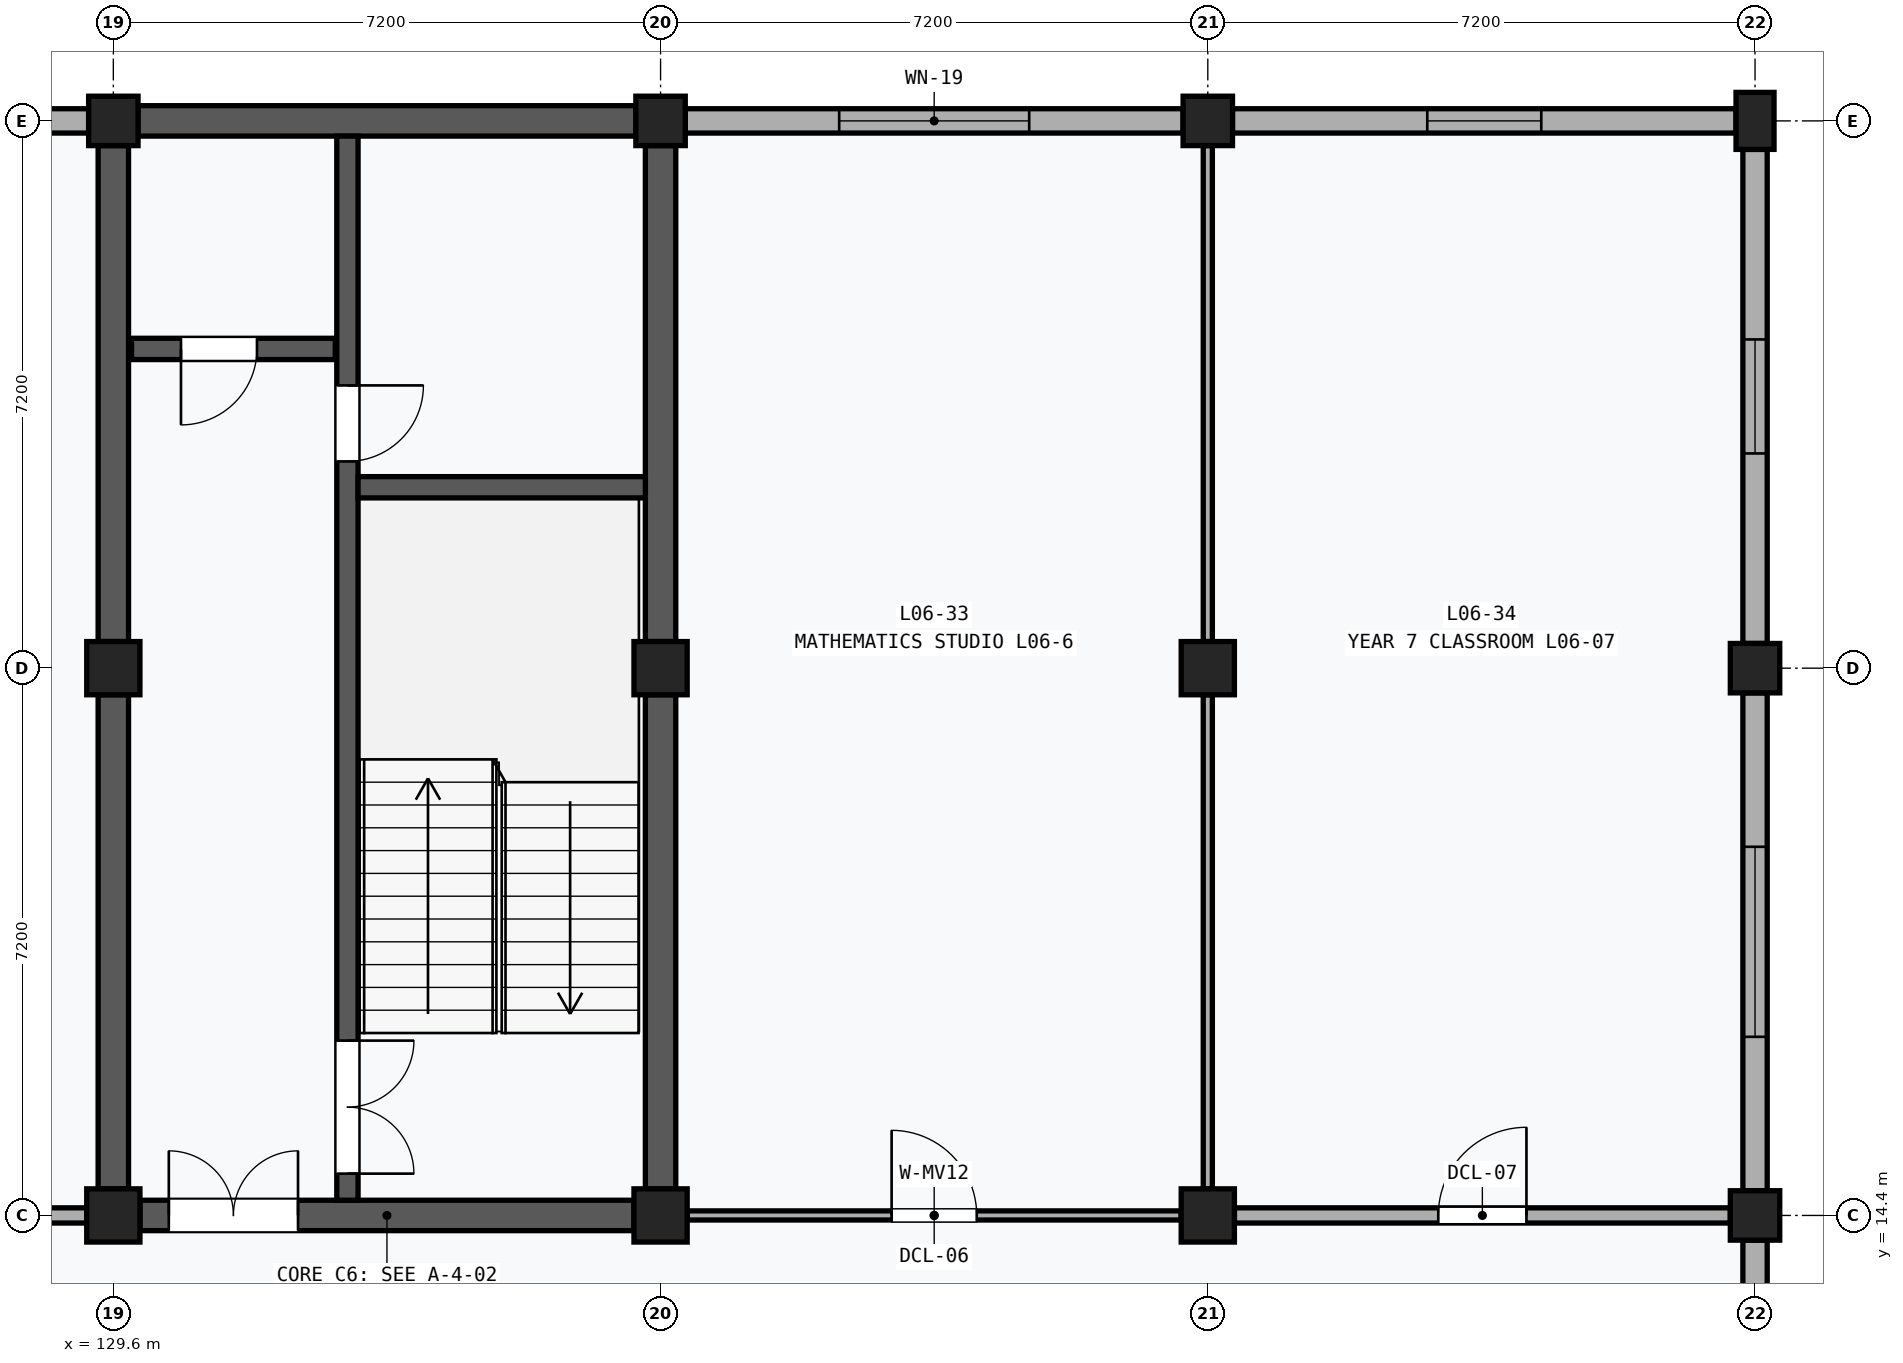
"""IFC4 building model, lengths in metres.
Left out: names, types, materials, properties, quantities, classifications, styles, units other than length and angle.
Written with IfcOpenShell. Run it as: python <this file> out.ifc"""

import sys

from ifc_helpers import new_model, si_unit, direction, frame, frame_2d, origin, origin_2d, place, context, subcontext, project, spatial, rectangle, extrude, element, fill, save


model = new_model("IFC4")
c1 = context("Model", 3, precision=1e-05, world=origin(), true_north=direction((0.0, 1.0)))
c2 = subcontext(c1, "Body", "Model", "MODEL_VIEW")
j1 = project(units=[si_unit("LENGTHUNIT", "METRE"), si_unit("PLANEANGLEUNIT", "RADIAN")], contexts=[c1])
p1 = place(None, origin())
s1 = spatial("IfcSite", under=j1, at=p1, CompositionType="ELEMENT")
p2 = place(p1, origin())
s2 = spatial("IfcBuilding", under=s1, at=p2, CompositionType="ELEMENT")
p3 = place(p2, frame((0.0, 0.0, 26.6)))
s3 = spatial("IfcBuildingStorey", under=s2, at=p3, CompositionType="ELEMENT", Elevation=26.6)
for number, where, z_axis, x_axis in (
    (1, (129.6, 14.4, 0.0), (0.0, 0.0, 1.0), (1.0, 0.0, 0.0)),
    (2, (129.6, 21.6, 0.0), (0.0, 0.0, 1.0), (1.0, 0.0, 0.0)),
):
    element("IfcColumn", number, at=place(p3, frame(where, z_axis=z_axis, x_axis=x_axis)), inside=s3, PredefinedType="COLUMN", context=c2, shape_type="SweptSolid", body=[
        extrude(rectangle(XDim=0.7, YDim=0.7, at=origin_2d()), origin(), (0.0, 0.0, 1.0), 4.0),
    ])
p4 = place(p3, frame((129.6, 28.8, 0.0), z_axis=(0.0, 0.0, 1.0), x_axis=(1.0, 0.0, 0.0)))
e3 = element("IfcColumn", 3, at=p4, inside=s3, PredefinedType="COLUMN", context=c2, shape_type="SweptSolid", body=[
    extrude(rectangle(XDim=0.65, YDim=0.65, at=origin_2d()), origin(), (0.0, 0.0, 1.0), 4.0),
])
for number, where, z_axis, x_axis in (
    (4, (136.8, 14.4, 0.0), (0.0, 0.0, 1.0), (1.0, 0.0, 0.0)),
    (5, (136.8, 21.6, 0.0), (0.0, 0.0, 1.0), (1.0, 0.0, 0.0)),
):
    element("IfcColumn", number, at=place(p3, frame(where, z_axis=z_axis, x_axis=x_axis)), inside=s3, PredefinedType="COLUMN", context=c2, shape_type="SweptSolid", body=[
        extrude(rectangle(XDim=0.7, YDim=0.7, at=origin_2d()), origin(), (0.0, 0.0, 1.0), 4.0),
    ])
p5 = place(p3, frame((136.8, 28.8, 0.0), z_axis=(0.0, 0.0, 1.0), x_axis=(1.0, 0.0, 0.0)))
e6 = element("IfcColumn", 6, at=p5, inside=s3, PredefinedType="COLUMN", context=c2, shape_type="SweptSolid", body=[
    extrude(rectangle(XDim=0.65, YDim=0.65, at=origin_2d()), origin(), (0.0, 0.0, 1.0), 4.0),
])
for number, where, z_axis, x_axis in (
    (7, (144.0, 14.4, 0.0), (0.0, 0.0, 1.0), (1.0, 0.0, 0.0)),
    (8, (144.0, 21.6, 0.0), (0.0, 0.0, 1.0), (1.0, 0.0, 0.0)),
):
    element("IfcColumn", number, at=place(p3, frame(where, z_axis=z_axis, x_axis=x_axis)), inside=s3, PredefinedType="COLUMN", context=c2, shape_type="SweptSolid", body=[
        extrude(rectangle(XDim=0.7, YDim=0.7, at=origin_2d()), origin(), (0.0, 0.0, 1.0), 4.0),
    ])
for number, where, z_axis, x_axis in (
    (9, (144.0, 28.8, 0.0), (0.0, 0.0, 1.0), (1.0, 0.0, 0.0)),
    (10, (151.2, 14.4, 0.0), (0.0, 0.0, 1.0), (1.0, 0.0, 0.0)),
    (11, (151.2, 21.6, 0.0), (0.0, 0.0, 1.0), (1.0, 0.0, 0.0)),
):
    element("IfcColumn", number, at=place(p3, frame(where, z_axis=z_axis, x_axis=x_axis)), inside=s3, PredefinedType="COLUMN", context=c2, shape_type="SweptSolid", body=[
        extrude(rectangle(XDim=0.65, YDim=0.65, at=origin_2d()), origin(), (0.0, 0.0, 1.0), 4.0),
    ])
p6 = place(p3, frame((151.2, 28.8, 0.0), z_axis=(0.0, 0.0, 1.0), x_axis=(1.0, 0.0, 0.0)))
e12 = element("IfcColumn", 12, at=p6, inside=s3, PredefinedType="PILASTER", context=c2, shape_type="SweptSolid", body=[
    extrude(rectangle(XDim=0.5, YDim=0.75, at=origin_2d()), origin(), (0.0, 0.0, 1.0), 4.0),
])
p7 = place(p3, frame((122.725, 28.8, 0.0), z_axis=(0.0, 0.0, 1.0), x_axis=(1.0, 0.0, 0.0)))
e13 = element("IfcWall", 13, at=p7, inside=s3, PredefinedType="SOLIDWALL", context=c2, shape_type="SweptSolid", body=[
    extrude(rectangle(XDim=6.55, YDim=0.32, at=frame_2d((3.275, 0.0))), origin(), (0.0, 0.0, 1.0), 3.1),
])
p8 = place(p7, frame((2.325, 0.0, 1.1)))
e14 = element("IfcOpeningElement", 14, at=p8, cuts=e13, PredefinedType="OPENING", context=c2, shape_type="SweptSolid", body=[
    extrude(rectangle(XDim=1.9, YDim=1.5, at=frame_2d((0.95, 0.75))), frame((0.0, 0.172, 0.0), z_axis=(0.0, -1.0, 0.0), x_axis=(1.0, 0.0, 0.0)), (0.0, 0.0, 1.0), 0.344),
])
p9 = place(p3, frame((137.125, 28.8, 0.0), z_axis=(0.0, 0.0, 1.0), x_axis=(1.0, 0.0, 0.0)))
e15 = element("IfcWall", 15, at=p9, inside=s3, PredefinedType="SOLIDWALL", context=c2, shape_type="SweptSolid", body=[
    extrude(rectangle(XDim=6.55, YDim=0.32, at=frame_2d((3.275, 0.0))), origin(), (0.0, 0.0, 1.0), 3.1),
])
p10 = place(p9, frame((2.025, 0.0, 1.1)))
e16 = element("IfcOpeningElement", 16, at=p10, cuts=e15, PredefinedType="OPENING", context=c2, shape_type="SweptSolid", body=[
    extrude(rectangle(XDim=2.5, YDim=1.5, at=frame_2d((1.25, 0.75))), frame((0.0, 0.172, 0.0), z_axis=(0.0, -1.0, 0.0), x_axis=(1.0, 0.0, 0.0)), (0.0, 0.0, 1.0), 0.344),
])
p11 = place(p3, frame((151.2, 7.525, 0.0), z_axis=(0.0, 0.0, 1.0), x_axis=(0.0, 1.0, 0.0)))
e17 = element("IfcWall", 17, at=p11, inside=s3, PredefinedType="SOLIDWALL", context=c2, shape_type="SweptSolid", body=[
    extrude(rectangle(XDim=6.55, YDim=0.32, at=frame_2d((3.275, 0.0))), origin(), (0.0, 0.0, 1.0), 3.1),
])
p12 = place(p11, frame((2.175, 0.0, 1.1)))
e18 = element("IfcOpeningElement", 18, at=p12, cuts=e17, PredefinedType="OPENING", context=c2, shape_type="SweptSolid", body=[
    extrude(rectangle(XDim=2.2, YDim=1.5, at=frame_2d((1.1, 0.75))), frame((0.0, 0.172, 0.0), z_axis=(0.0, -1.0, 0.0), x_axis=(1.0, 0.0, 0.0)), (0.0, 0.0, 1.0), 0.344),
])
p13 = place(p3, frame((151.2, 14.725, 0.0), z_axis=(0.0, 0.0, 1.0), x_axis=(0.0, 1.0, 0.0)))
e19 = element("IfcWall", 19, at=p13, inside=s3, PredefinedType="SOLIDWALL", context=c2, shape_type="SweptSolid", body=[
    extrude(rectangle(XDim=6.55, YDim=0.32, at=frame_2d((3.275, 0.0))), origin(), (0.0, 0.0, 1.0), 3.1),
])
p14 = place(p13, frame((2.025, 0.0, 1.1)))
e20 = element("IfcOpeningElement", 20, at=p14, cuts=e19, PredefinedType="OPENING", context=c2, shape_type="SweptSolid", body=[
    extrude(rectangle(XDim=2.5, YDim=1.5, at=frame_2d((1.25, 0.75))), frame((0.0, 0.172, 0.0), z_axis=(0.0, -1.0, 0.0), x_axis=(1.0, 0.0, 0.0)), (0.0, 0.0, 1.0), 0.344),
])
p15 = place(p3, frame((144.325, 28.8, 0.0), z_axis=(0.0, 0.0, 1.0), x_axis=(1.0, 0.0, 0.0)))
e21 = element("IfcWall", 21, at=p15, inside=s3, PredefinedType="SOLIDWALL", context=c2, shape_type="SweptSolid", body=[
    extrude(rectangle(XDim=6.625, YDim=0.32, at=frame_2d((3.312, 0.0))), origin(), (0.0, 0.0, 1.0), 3.1),
])
p16 = place(p15, frame((2.562, 0.0, 1.2)))
e22 = element("IfcOpeningElement", 22, at=p16, cuts=e21, PredefinedType="OPENING", context=c2, shape_type="SweptSolid", body=[
    extrude(rectangle(XDim=1.5, YDim=1.35, at=frame_2d((0.75, 0.675))), frame((0.0, 0.172, 0.0), z_axis=(0.0, -1.0, 0.0), x_axis=(1.0, 0.0, 0.0)), (0.0, 0.0, 1.0), 0.344),
])
p17 = place(p3, frame((151.2, 21.925, 0.0), z_axis=(0.0, 0.0, 1.0), x_axis=(0.0, 1.0, 0.0)))
e23 = element("IfcWall", 23, at=p17, inside=s3, PredefinedType="SOLIDWALL", context=c2, shape_type="SweptSolid", body=[
    extrude(rectangle(XDim=6.5, YDim=0.32, at=frame_2d((3.25, 0.0))), origin(), (0.0, 0.0, 1.0), 3.1),
])
p18 = place(p17, frame((2.5, 0.0, 1.2)))
e24 = element("IfcOpeningElement", 24, at=p18, cuts=e23, PredefinedType="OPENING", context=c2, shape_type="SweptSolid", body=[
    extrude(rectangle(XDim=1.5, YDim=1.35, at=frame_2d((0.75, 0.675))), frame((0.0, 0.172, 0.0), z_axis=(0.0, -1.0, 0.0), x_axis=(1.0, 0.0, 0.0)), (0.0, 0.0, 1.0), 0.344),
])
p19 = place(p3, frame((129.6, 14.75, 0.0), z_axis=(0.0, 0.0, 1.0), x_axis=(0.0, 1.0, 0.0)))
e25 = element("IfcWall", 25, at=p19, inside=s3, PredefinedType="SHEAR", context=c2, shape_type="SweptSolid", body=[
    extrude(rectangle(XDim=6.5, YDim=0.4, at=frame_2d((3.25, 0.0))), origin(), (0.0, 0.0, 1.0), 2.96),
])
p20 = place(p3, frame((129.6, 21.95, 0.0), z_axis=(0.0, 0.0, 1.0), x_axis=(0.0, 1.0, 0.0)))
e26 = element("IfcWall", 26, at=p20, inside=s3, PredefinedType="SHEAR", context=c2, shape_type="SweptSolid", body=[
    extrude(rectangle(XDim=6.525, YDim=0.4, at=frame_2d((3.263, 0.0))), origin(), (0.0, 0.0, 1.0), 2.96),
])
p21 = place(p3, frame((136.8, 14.75, 0.0), z_axis=(0.0, 0.0, 1.0), x_axis=(0.0, 1.0, 0.0)))
e27 = element("IfcWall", 27, at=p21, inside=s3, PredefinedType="SHEAR", context=c2, shape_type="SweptSolid", body=[
    extrude(rectangle(XDim=6.5, YDim=0.4, at=frame_2d((3.25, 0.0))), origin(), (0.0, 0.0, 1.0), 2.96),
])
p22 = place(p3, frame((136.8, 21.95, 0.0), z_axis=(0.0, 0.0, 1.0), x_axis=(0.0, 1.0, 0.0)))
e28 = element("IfcWall", 28, at=p22, inside=s3, PredefinedType="SHEAR", context=c2, shape_type="SweptSolid", body=[
    extrude(rectangle(XDim=6.525, YDim=0.4, at=frame_2d((3.263, 0.0))), origin(), (0.0, 0.0, 1.0), 2.96),
])
p23 = place(p3, frame((129.95, 14.4, 0.0), z_axis=(0.0, 0.0, 1.0), x_axis=(1.0, 0.0, 0.0)))
e29 = element("IfcWall", 29, at=p23, inside=s3, PredefinedType="SHEAR", context=c2, shape_type="SweptSolid", body=[
    extrude(rectangle(XDim=6.5, YDim=0.4, at=frame_2d((3.25, 0.0))), origin(), (0.0, 0.0, 1.0), 3.03),
])
p24 = place(p23, frame((0.38, 0.0, 0.0)))
e30 = element("IfcOpeningElement", 30, at=p24, cuts=e29, PredefinedType="OPENING", context=c2, shape_type="SweptSolid", body=[
    extrude(rectangle(XDim=1.7, YDim=2.25, at=frame_2d((0.85, 1.125))), frame((0.0, 0.212, 0.0), z_axis=(0.0, -1.0, 0.0), x_axis=(1.0, 0.0, 0.0)), (0.0, 0.0, 1.0), 0.424),
])
p25 = place(p3, frame((129.925, 28.8, 0.0), z_axis=(0.0, 0.0, 1.0), x_axis=(1.0, 0.0, 0.0)))
e31 = element("IfcWall", 31, at=p25, inside=s3, PredefinedType="SHEAR", context=c2, shape_type="SweptSolid", body=[
    extrude(rectangle(XDim=6.55, YDim=0.4, at=frame_2d((3.275, 0.0))), origin(), (0.0, 0.0, 1.0), 3.1),
])
p26 = place(p3, frame((132.68, 14.6, 0.0), z_axis=(0.0, 0.0, 1.0), x_axis=(0.0, 1.0, 0.0)))
e32 = element("IfcWall", 32, at=p26, inside=s3, PredefinedType="SHEAR", context=c2, shape_type="SweptSolid", body=[
    extrude(rectangle(XDim=14.0, YDim=0.28, at=frame_2d((7.0, 0.0))), origin(), (0.0, 0.0, 1.0), 3.73),
])
p27 = place(p26, frame((0.35, 0.0, 0.0)))
e33 = element("IfcOpeningElement", 33, at=p27, cuts=e32, PredefinedType="OPENING", context=c2, shape_type="SweptSolid", body=[
    extrude(rectangle(XDim=1.75, YDim=2.15, at=frame_2d((0.875, 1.075))), frame((0.0, 0.152, 0.0), z_axis=(0.0, -1.0, 0.0), x_axis=(1.0, 0.0, 0.0)), (0.0, 0.0, 1.0), 0.304),
])
p28 = place(p26, frame((9.72, 0.0, 0.0)))
e34 = element("IfcOpeningElement", 34, at=p28, cuts=e32, PredefinedType="OPENING", context=c2, shape_type="SweptSolid", body=[
    extrude(rectangle(XDim=1.0, YDim=2.15, at=frame_2d((0.5, 1.075))), frame((0.0, 0.152, 0.0), z_axis=(0.0, -1.0, 0.0), x_axis=(1.0, 0.0, 0.0)), (0.0, 0.0, 1.0), 0.304),
])
p29 = place(p3, frame((132.82, 23.98, 0.0), z_axis=(0.0, 0.0, 1.0), x_axis=(1.0, 0.0, 0.0)))
e35 = element("IfcWall", 35, at=p29, inside=s3, PredefinedType="SHEAR", context=c2, shape_type="SweptSolid", body=[
    extrude(rectangle(XDim=3.78, YDim=0.28, at=frame_2d((1.89, 0.0))), origin(), (0.0, 0.0, 1.0), 3.73),
])
p30 = place(p3, frame((129.84, 25.8, 0.0), z_axis=(0.0, 0.0, 1.0), x_axis=(1.0, 0.0, 0.0)))
e36 = element("IfcWall", 36, at=p30, inside=s3, PredefinedType="SHEAR", context=c2, shape_type="SweptSolid", body=[
    extrude(rectangle(XDim=2.68, YDim=0.28, at=frame_2d((1.34, 0.0))), origin(), (0.0, 0.0, 1.0), 3.73),
])
p31 = place(p30, frame((0.65, 0.0, 0.0)))
e37 = element("IfcOpeningElement", 37, at=p31, cuts=e36, PredefinedType="OPENING", context=c2, shape_type="SweptSolid", body=[
    extrude(rectangle(XDim=1.0, YDim=2.15, at=frame_2d((0.5, 1.075))), frame((0.0, 0.152, 0.0), z_axis=(0.0, -1.0, 0.0), x_axis=(1.0, 0.0, 0.0)), (0.0, 0.0, 1.0), 0.304),
])
p32 = place(p3, frame((122.75, 14.4, 0.0), z_axis=(0.0, 0.0, 1.0), x_axis=(1.0, 0.0, 0.0)))
e38 = element("IfcWall", 38, at=p32, inside=s3, PredefinedType="PARTITIONING", context=c2, shape_type="SweptSolid", body=[
    extrude(rectangle(XDim=6.5, YDim=0.2, at=frame_2d((3.25, 0.0))), origin(), (0.0, 0.0, 1.0), 2.96),
])
p33 = place(p32, frame((2.71, 0.0, 0.0)))
e39 = element("IfcOpeningElement", 39, at=p33, cuts=e38, PredefinedType="OPENING", context=c2, shape_type="SweptSolid", body=[
    extrude(rectangle(XDim=1.08, YDim=2.18, at=frame_2d((0.54, 1.09))), frame((0.0, 0.112, 0.0), z_axis=(0.0, -1.0, 0.0), x_axis=(1.0, 0.0, 0.0)), (0.0, 0.0, 1.0), 0.224),
])
p34 = place(p3, frame((137.15, 14.4, 0.0), z_axis=(0.0, 0.0, 1.0), x_axis=(1.0, 0.0, 0.0)))
e40 = element("IfcWall", 40, at=p34, inside=s3, PredefinedType="MOVABLE", context=c2, shape_type="SweptSolid", body=[
    extrude(rectangle(XDim=6.5, YDim=0.12, at=frame_2d((3.25, 0.0))), origin(), (0.0, 0.0, 1.0), 2.96),
])
p35 = place(p34, frame((2.69, 0.0, 0.0)))
e41 = element("IfcOpeningElement", 41, at=p35, cuts=e40, PredefinedType="OPENING", context=c2, shape_type="SweptSolid", body=[
    extrude(rectangle(XDim=1.12, YDim=2.2, at=frame_2d((0.56, 1.1))), frame((0.0, 0.072, 0.0), z_axis=(0.0, -1.0, 0.0), x_axis=(1.0, 0.0, 0.0)), (0.0, 0.0, 1.0), 0.144),
])
p36 = place(p3, frame((144.0, 14.75, 0.0), z_axis=(0.0, 0.0, 1.0), x_axis=(0.0, 1.0, 0.0)))
e42 = element("IfcWall", 42, at=p36, inside=s3, PredefinedType="MOVABLE", context=c2, shape_type="SweptSolid", body=[
    extrude(rectangle(XDim=6.5, YDim=0.12, at=frame_2d((3.25, 0.0))), origin(), (0.0, 0.0, 1.0), 2.96),
])
p37 = place(p3, frame((144.0, 21.95, 0.0), z_axis=(0.0, 0.0, 1.0), x_axis=(0.0, 1.0, 0.0)))
e43 = element("IfcWall", 43, at=p37, inside=s3, PredefinedType="MOVABLE", context=c2, shape_type="SweptSolid", body=[
    extrude(rectangle(XDim=6.525, YDim=0.12, at=frame_2d((3.263, 0.0))), origin(), (0.0, 0.0, 1.0), 2.96),
])
p38 = place(p3, frame((144.35, 14.4, 0.0), z_axis=(0.0, 0.0, 1.0), x_axis=(1.0, 0.0, 0.0)))
e44 = element("IfcWall", 44, at=p38, inside=s3, PredefinedType="PARTITIONING", context=c2, shape_type="SweptSolid", body=[
    extrude(rectangle(XDim=6.525, YDim=0.2, at=frame_2d((3.262, 0.0))), origin(), (0.0, 0.0, 1.0), 2.96),
])
p39 = place(p38, frame((2.683, 0.0, 0.0)))
e45 = element("IfcOpeningElement", 45, at=p39, cuts=e44, PredefinedType="OPENING", context=c2, shape_type="SweptSolid", body=[
    extrude(rectangle(XDim=1.16, YDim=2.22, at=frame_2d((0.58, 1.11))), frame((0.0, 0.112, 0.0), z_axis=(0.0, -1.0, 0.0), x_axis=(1.0, 0.0, 0.0)), (0.0, 0.0, 1.0), 0.224),
])
p40 = place(p10, origin())
e46 = element("IfcWindow", 46, at=p40, inside=s3, PartitioningType="SINGLE_PANEL", PredefinedType="WINDOW", context=c2, shape_type="SweptSolid", body=[
    extrude(rectangle(XDim=2.5, YDim=1.5, at=frame_2d((1.25, 0.75))), frame((0.0, 0.03, 0.0), z_axis=(0.0, -1.0, 0.0), x_axis=(1.0, 0.0, 0.0)), (0.0, 0.0, 1.0), 0.06),
])
fill(e16, e46)
p41 = place(p14, origin())
e47 = element("IfcWindow", 47, at=p41, inside=s3, PartitioningType="SINGLE_PANEL", PredefinedType="WINDOW", context=c2, shape_type="SweptSolid", body=[
    extrude(rectangle(XDim=2.5, YDim=1.5, at=frame_2d((1.25, 0.75))), frame((0.0, 0.03, 0.0), z_axis=(0.0, -1.0, 0.0), x_axis=(1.0, 0.0, 0.0)), (0.0, 0.0, 1.0), 0.06),
])
fill(e20, e47)
p42 = place(p16, origin())
e48 = element("IfcWindow", 48, at=p42, inside=s3, PartitioningType="SINGLE_PANEL", PredefinedType="WINDOW", context=c2, shape_type="SweptSolid", body=[
    extrude(rectangle(XDim=1.5, YDim=1.35, at=frame_2d((0.75, 0.675))), frame((0.0, 0.03, 0.0), z_axis=(0.0, -1.0, 0.0), x_axis=(1.0, 0.0, 0.0)), (0.0, 0.0, 1.0), 0.06),
])
fill(e22, e48)
p43 = place(p18, origin())
e49 = element("IfcWindow", 49, at=p43, inside=s3, PartitioningType="SINGLE_PANEL", PredefinedType="WINDOW", context=c2, shape_type="SweptSolid", body=[
    extrude(rectangle(XDim=1.5, YDim=1.35, at=frame_2d((0.75, 0.675))), frame((0.0, 0.03, 0.0), z_axis=(0.0, -1.0, 0.0), x_axis=(1.0, 0.0, 0.0)), (0.0, 0.0, 1.0), 0.06),
])
fill(e24, e49)
p44 = place(p24, origin())
e50 = element("IfcDoor", 50, at=p44, inside=s3, OperationType="DOUBLE_DOOR_SINGLE_SWING", PredefinedType="DOOR", context=c2, shape_type="SweptSolid", body=[
    extrude(rectangle(XDim=1.7, YDim=2.25, at=frame_2d((0.85, 1.125))), frame((0.0, 0.025, 0.0), z_axis=(0.0, -1.0, 0.0), x_axis=(1.0, 0.0, 0.0)), (0.0, 0.0, 1.0), 0.05),
])
fill(e30, e50)
p45 = place(p27, frame((1.75, 0.0, 0.0), z_axis=(0.0, 0.0, 1.0), x_axis=(-1.0, 0.0, 0.0)))
e51 = element("IfcDoor", 51, at=p45, inside=s3, OperationType="DOUBLE_DOOR_SINGLE_SWING", PredefinedType="DOOR", context=c2, shape_type="SweptSolid", body=[
    extrude(rectangle(XDim=1.75, YDim=2.15, at=frame_2d((0.875, 1.075))), frame((0.0, 0.025, 0.0), z_axis=(0.0, -1.0, 0.0), x_axis=(1.0, 0.0, 0.0)), (0.0, 0.0, 1.0), 0.05),
])
fill(e33, e51)
p46 = place(p28, frame((1.0, 0.0, 0.0), z_axis=(0.0, 0.0, 1.0), x_axis=(-1.0, 0.0, 0.0)))
e52 = element("IfcDoor", 52, at=p46, inside=s3, OperationType="SINGLE_SWING_LEFT", PredefinedType="DOOR", context=c2, shape_type="SweptSolid", body=[
    extrude(rectangle(XDim=1.0, YDim=2.15, at=frame_2d((0.5, 1.075))), frame((0.0, 0.025, 0.0), z_axis=(0.0, -1.0, 0.0), x_axis=(1.0, 0.0, 0.0)), (0.0, 0.0, 1.0), 0.05),
])
fill(e34, e52)
p47 = place(p31, frame((1.0, 0.0, 0.0), z_axis=(0.0, 0.0, 1.0), x_axis=(-1.0, 0.0, 0.0)))
e53 = element("IfcDoor", 53, at=p47, inside=s3, OperationType="SINGLE_SWING_RIGHT", PredefinedType="DOOR", context=c2, shape_type="SweptSolid", body=[
    extrude(rectangle(XDim=1.0, YDim=2.15, at=frame_2d((0.5, 1.075))), frame((0.0, 0.025, 0.0), z_axis=(0.0, -1.0, 0.0), x_axis=(1.0, 0.0, 0.0)), (0.0, 0.0, 1.0), 0.05),
])
fill(e37, e53)
p48 = place(p35, origin())
e54 = element("IfcDoor", 54, at=p48, inside=s3, OperationType="SINGLE_SWING_LEFT", PredefinedType="DOOR", context=c2, shape_type="SweptSolid", body=[
    extrude(rectangle(XDim=1.12, YDim=2.2, at=frame_2d((0.56, 1.1))), frame((0.0, 0.025, 0.0), z_axis=(0.0, -1.0, 0.0), x_axis=(1.0, 0.0, 0.0)), (0.0, 0.0, 1.0), 0.05),
])
fill(e41, e54)
p49 = place(p39, origin())
e55 = element("IfcDoor", 55, at=p49, inside=s3, OperationType="SINGLE_SWING_RIGHT", PredefinedType="DOOR", context=c2, shape_type="SweptSolid", body=[
    extrude(rectangle(XDim=1.16, YDim=2.22, at=frame_2d((0.58, 1.11))), frame((0.0, 0.025, 0.0), z_axis=(0.0, -1.0, 0.0), x_axis=(1.0, 0.0, 0.0)), (0.0, 0.0, 1.0), 0.05),
])
fill(e45, e55)
save(model, sys.argv[1])
